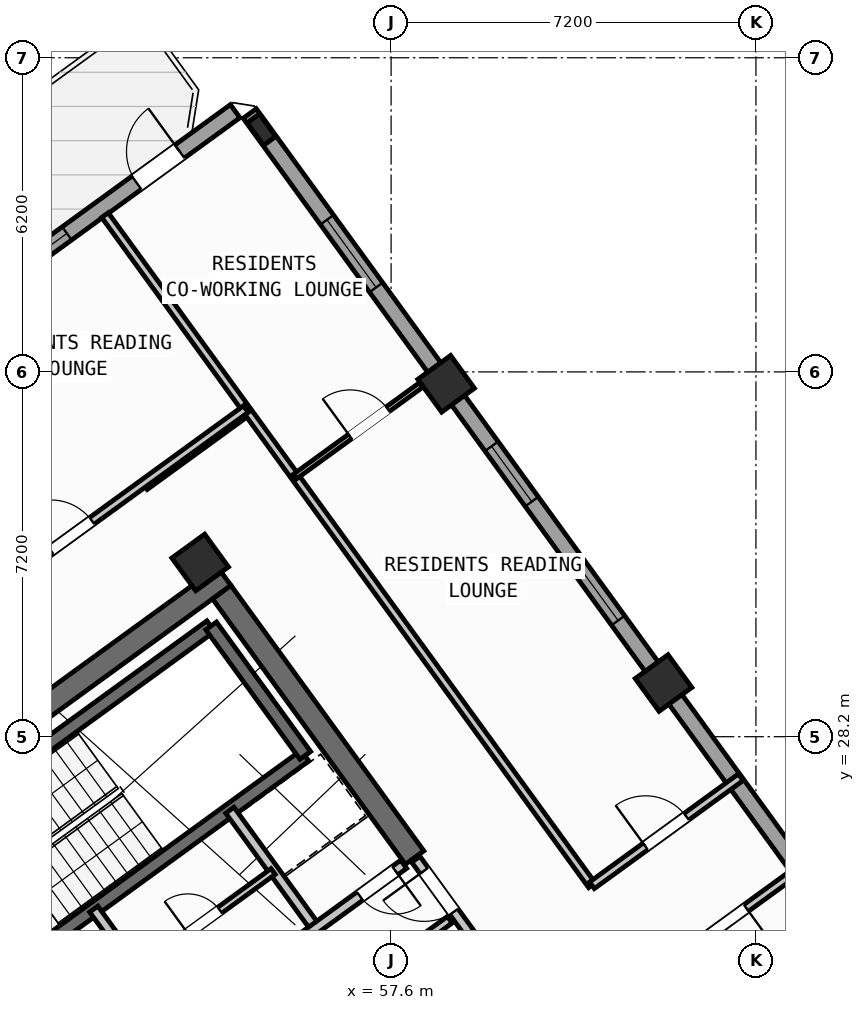
"""IFC4 building model, lengths in metres.
Left out: names, types, materials, properties, quantities, classifications, styles, units other than length and angle.
Written with IfcOpenShell. Run it as: python <this file> out.ifc"""

import sys

from ifc_helpers import new_model, si_unit, direction, frame, frame_2d, origin, origin_2d, place, context, subcontext, project, spatial, rectangle, hollow_rectangle, i_section, extrude, source, transform, mapped, element, fill, save


model = new_model("IFC4")
c1 = context("Model", 3, precision=1e-05, world=origin(), true_north=direction((0.0, 1.0)))
c2 = subcontext(c1, "Body", "Model", "MODEL_VIEW")
j1 = project(units=[si_unit("LENGTHUNIT", "METRE"), si_unit("PLANEANGLEUNIT", "RADIAN")], contexts=[c1])
p1 = place(None, origin())
s1 = spatial("IfcSite", under=j1, at=p1, CompositionType="ELEMENT")
p2 = place(p1, origin())
s2 = spatial("IfcBuilding", under=s1, at=p2, CompositionType="ELEMENT")
p3 = place(p2, frame((0.0, 0.0, 225.6)))
s3 = spatial("IfcBuildingStorey", under=s2, at=p3, CompositionType="ELEMENT", Elevation=225.6)
p4 = place(p3, frame((44.406, 24.172, 0.0), z_axis=(0.0, 0.0, 1.0), x_axis=(0.809012867805, 0.587790931986, 0.0)))
e1 = element("IfcWall", 1, at=p4, inside=s3, PredefinedType="SHEAR", context=c2, shape_type="SweptSolid", body=[
    extrude(rectangle(XDim=12.24, YDim=0.45, at=frame_2d((6.12, 0.0))), origin(), (0.0, 0.0, 1.0), 3.35),
])
p5 = place(p3, frame((58.064, 25.813, 0.0), z_axis=(0.0, 0.0, 1.0), x_axis=(-0.587774812919, 0.809024578921, 0.0)))
e2 = element("IfcWall", 2, at=p5, inside=s3, PredefinedType="SHEAR", context=c2, shape_type="SweptSolid", body=[
    extrude(rectangle(XDim=6.475, YDim=0.45, at=frame_2d((3.238, 0.0))), origin(), (0.0, 0.0, 1.0), 3.35),
])
m1 = source(origin(), c2, "Body", "SweptSolid", [
    extrude(hollow_rectangle(XDim=0.8, YDim=0.8, WallThickness=0.032, at=origin_2d()), origin(), (0.0, 0.0, 1.0), 3.6),
])
for number, where, z_axis, x_axis in (
    (3, (53.832, 31.638, 0.0), (0.0, 0.0, 1.0), (0.809, 0.588, 0.0)),
    (4, (62.977, 29.259, 0.0), (0.0, 0.0, 1.0), (0.809, 0.588, 0.0)),
    (5, (58.686, 35.165, 0.0), (0.0, 0.0, 1.0), (0.809, 0.588, 0.0)),
):
    element("IfcColumn", number, at=place(p3, frame(where, z_axis=z_axis, x_axis=x_axis)), inside=s3, PredefinedType="COLUMN", context=c2, shape_type="MappedRepresentation", body=[
        mapped(m1, transform((0.0, 0.0, 0.0), scale=1.0)),
    ])
m2 = source(origin(), c2, "Body", "SweptSolid", [
    extrude(i_section(OverallWidth=0.3, OverallDepth=0.55, WebThickness=0.015, FlangeThickness=0.029, at=origin_2d()), origin(), (0.0, 0.0, 1.0), 3.6),
])
p6 = place(p3, frame((55.042, 40.181, 0.0), z_axis=(0.0, 0.0, 1.0), x_axis=(0.809016994375, 0.587785252292, 0.0)))
e6 = element("IfcColumn", 6, at=p6, inside=s3, PredefinedType="COLUMN", context=c2, shape_type="MappedRepresentation", body=[
    mapped(m2, transform((0.0, 0.0, 0.0), scale=1.0)),
])
p7 = place(p3, frame((42.207, 31.597, 0.0), z_axis=(0.0, 0.0, 1.0), x_axis=(0.809020333377, 0.587780656523, 0.0)))
e7 = element("IfcWall", 7, at=p7, inside=s3, PredefinedType="STANDARD", context=c2, shape_type="SweptSolid", body=[
    extrude(rectangle(XDim=15.223, YDim=0.32, at=frame_2d((7.611, 0.0))), origin(), (0.0, 0.0, 1.0), 3.35),
])
p8 = place(p7, frame((12.82, 0.0, 0.0)))
e8 = element("IfcOpeningElement", 8, at=p8, cuts=e7, PredefinedType="OPENING", context=c2, shape_type="SweptSolid", body=[
    extrude(rectangle(XDim=1.05, YDim=2.15, at=frame_2d((0.525, 1.075))), frame((0.0, 0.17, 0.0), z_axis=(0.0, -1.0, 0.0), x_axis=(1.0, 0.0, 0.0)), (0.0, 0.0, 1.0), 0.34),
])
p9 = place(p7, frame((0.85, 0.0, 0.9)))
e9 = element("IfcOpeningElement", 9, at=p9, cuts=e7, PredefinedType="OPENING", context=c2, shape_type="SweptSolid", body=[
    extrude(rectangle(XDim=1.65, YDim=1.45, at=frame_2d((0.825, 0.725))), frame((0.0, 0.17, 0.0), z_axis=(0.0, -1.0, 0.0), x_axis=(1.0, 0.0, 0.0)), (0.0, 0.0, 1.0), 0.34),
])
p10 = place(p7, frame((5.769, 0.0, 0.9)))
e10 = element("IfcOpeningElement", 10, at=p10, cuts=e7, PredefinedType="OPENING", context=c2, shape_type="SweptSolid", body=[
    extrude(rectangle(XDim=1.35, YDim=1.45, at=frame_2d((0.675, 0.725))), frame((0.0, 0.17, 0.0), z_axis=(0.0, -1.0, 0.0), x_axis=(1.0, 0.0, 0.0)), (0.0, 0.0, 1.0), 0.34),
])
p11 = place(p7, frame((10.219, 0.0, 1.0)))
e11 = element("IfcOpeningElement", 11, at=p11, cuts=e7, PredefinedType="OPENING", context=c2, shape_type="SweptSolid", body=[
    extrude(rectangle(XDim=0.9, YDim=1.25, at=frame_2d((0.45, 0.625))), frame((0.0, 0.17, 0.0), z_axis=(0.0, -1.0, 0.0), x_axis=(1.0, 0.0, 0.0)), (0.0, 0.0, 1.0), 0.34),
])
p12 = place(p3, frame((54.81, 40.5, 0.0), z_axis=(0.0, 0.0, 1.0), x_axis=(0.587783625747, -0.809018176127, 0.0)))
e12 = element("IfcWall", 12, at=p12, inside=s3, PredefinedType="STANDARD", context=c2, shape_type="SweptSolid", body=[
    extrude(rectangle(XDim=21.587, YDim=0.32, at=frame_2d((10.794, 0.0))), origin(), (0.0, 0.0, 1.0), 2.825),
])
p13 = place(p12, frame((2.593, 0.0, 0.9)))
e13 = element("IfcOpeningElement", 13, at=p13, cuts=e12, PredefinedType="OPENING", context=c2, shape_type="SweptSolid", body=[
    extrude(rectangle(XDim=1.65, YDim=1.45, at=frame_2d((0.825, 0.725))), frame((0.0, 0.17, 0.0), z_axis=(0.0, -1.0, 0.0), x_axis=(1.0, 0.0, 0.0)), (0.0, 0.0, 1.0), 0.34),
])
p14 = place(p12, frame((8.119, 0.0, 0.9)))
e14 = element("IfcOpeningElement", 14, at=p14, cuts=e12, PredefinedType="OPENING", context=c2, shape_type="SweptSolid", body=[
    extrude(rectangle(XDim=1.35, YDim=1.45, at=frame_2d((0.675, 0.725))), frame((0.0, 0.17, 0.0), z_axis=(0.0, -1.0, 0.0), x_axis=(1.0, 0.0, 0.0)), (0.0, 0.0, 1.0), 0.34),
])
p15 = place(p12, frame((11.019, 0.0, 0.9)))
e15 = element("IfcOpeningElement", 15, at=p15, cuts=e12, PredefinedType="OPENING", context=c2, shape_type="SweptSolid", body=[
    extrude(rectangle(XDim=1.35, YDim=1.45, at=frame_2d((0.675, 0.725))), frame((0.0, 0.17, 0.0), z_axis=(0.0, -1.0, 0.0), x_axis=(1.0, 0.0, 0.0)), (0.0, 0.0, 1.0), 0.34),
])
p16 = place(p12, frame((19.259, 0.0, 1.0)))
e16 = element("IfcOpeningElement", 16, at=p16, cuts=e12, PredefinedType="OPENING", context=c2, shape_type="SweptSolid", body=[
    extrude(rectangle(XDim=0.9, YDim=1.25, at=frame_2d((0.45, 0.625))), frame((0.0, 0.17, 0.0), z_axis=(0.0, -1.0, 0.0), x_axis=(1.0, 0.0, 0.0)), (0.0, 0.0, 1.0), 0.34),
])
p17 = place(p3, frame((48.006, 25.996, 0.0), z_axis=(0.0, 0.0, 1.0), x_axis=(0.80901903764, 0.587782439969, 0.0)))
e17 = element("IfcWall", 17, at=p17, inside=s3, PredefinedType="SHEAR", context=c2, shape_type="SweptSolid", body=[
    extrude(rectangle(XDim=7.46, YDim=0.26, at=frame_2d((3.73, 0.0))), origin(), (0.0, 0.0, 1.0), 3.35),
])
p18 = place(p3, frame((49.863, 23.44, 0.0), z_axis=(0.0, 0.0, 1.0), x_axis=(0.809003474932, 0.587803859759, 0.0)))
e18 = element("IfcWall", 18, at=p18, inside=s3, PredefinedType="SHEAR", context=c2, shape_type="SweptSolid", body=[
    extrude(rectangle(XDim=7.46, YDim=0.26, at=frame_2d((3.73, 0.0))), origin(), (0.0, 0.0, 1.0), 3.35),
])
p19 = place(p18, frame((0.36, 0.0, 0.0)))
e19 = element("IfcOpeningElement", 19, at=p19, cuts=e18, PredefinedType="OPENING", context=c2, shape_type="SweptSolid", body=[
    extrude(rectangle(XDim=0.86, YDim=2.05, at=frame_2d((0.43, 1.025))), frame((0.0, 0.14, 0.0), z_axis=(0.0, -1.0, 0.0), x_axis=(1.0, 0.0, 0.0)), (0.0, 0.0, 1.0), 0.28),
])
p20 = place(p3, frame((55.906, 27.831, 0.0), z_axis=(0.0, 0.0, 1.0), x_axis=(-0.587804123638, 0.809003283204, 0.0)))
e20 = element("IfcWall", 20, at=p20, inside=s3, PredefinedType="SHEAR", context=c2, shape_type="SweptSolid", body=[
    extrude(rectangle(XDim=3.16, YDim=0.26, at=frame_2d((1.58, 0.0))), origin(), (0.0, 0.0, 1.0), 3.35),
])
p21 = place(p3, frame((54.421, 21.436, 0.0), z_axis=(0.0, 0.0, 1.0), x_axis=(0.809013710463, 0.587789772183, 0.0)))
e21 = element("IfcWall", 21, at=p21, inside=s3, PredefinedType="PARTITIONING", context=c2, shape_type="SweptSolid", body=[
    extrude(rectangle(XDim=5.36, YDim=0.16, at=frame_2d((2.68, 0.0))), origin(), (0.0, 0.0, 1.0), 3.34),
])
p22 = place(p21, frame((1.4, 0.0, 0.0)))
e22 = element("IfcOpeningElement", 22, at=p22, cuts=e21, PredefinedType="OPENING", context=c2, shape_type="SweptSolid", body=[
    extrude(rectangle(XDim=0.86, YDim=2.05, at=frame_2d((0.43, 1.025))), frame((0.0, 0.09, 0.0), z_axis=(0.0, -1.0, 0.0), x_axis=(1.0, 0.0, 0.0)), (0.0, 0.0, 1.0), 0.18),
])
p23 = place(p3, frame((53.425, 22.468, 0.0), z_axis=(0.0, 0.0, 1.0), x_axis=(-0.5877230039, 0.809062216821, 0.0)))
e23 = element("IfcWall", 23, at=p23, inside=s3, PredefinedType="STANDARD", context=c2, shape_type="SweptSolid", body=[
    extrude(rectangle(XDim=2.88, YDim=0.2, at=frame_2d((1.44, 0.0))), origin(), (0.0, 0.0, 1.0), 3.34),
])
p24 = place(p3, frame((56.111, 24.419, 0.0), z_axis=(0.0, 0.0, 1.0), x_axis=(-0.58777848983, 0.809021907548, 0.0)))
e24 = element("IfcWall", 24, at=p24, inside=s3, PredefinedType="STANDARD", context=c2, shape_type="SweptSolid", body=[
    extrude(rectangle(XDim=2.88, YDim=0.2, at=frame_2d((1.44, 0.0))), origin(), (0.0, 0.0, 1.0), 3.34),
])
p25 = place(p3, frame((53.425, 22.468, 0.0), z_axis=(0.0, 0.0, 1.0), x_axis=(0.809015945709, 0.587786695655, 0.0)))
e25 = element("IfcWall", 25, at=p25, inside=s3, PredefinedType="STANDARD", context=c2, shape_type="SweptSolid", body=[
    extrude(rectangle(XDim=5.468, YDim=0.2, at=frame_2d((2.734, 0.0))), origin(), (0.0, 0.0, 1.0), 3.34),
])
p26 = place(p25, frame((4.4, 0.0, 0.0)))
e26 = element("IfcOpeningElement", 26, at=p26, cuts=e25, PredefinedType="OPENING", context=c2, shape_type="SweptSolid", body=[
    extrude(rectangle(XDim=0.86, YDim=2.05, at=frame_2d((0.43, 1.025))), frame((0.0, 0.11, 0.0), z_axis=(0.0, -1.0, 0.0), x_axis=(1.0, 0.0, 0.0)), (0.0, 0.0, 1.0), 0.22),
])
p27 = place(p25, frame((1.45, 0.0, 0.0)))
e27 = element("IfcOpeningElement", 27, at=p27, cuts=e25, PredefinedType="OPENING", context=c2, shape_type="SweptSolid", body=[
    extrude(rectangle(XDim=0.86, YDim=2.05, at=frame_2d((0.43, 1.025))), frame((0.0, 0.11, 0.0), z_axis=(0.0, -1.0, 0.0), x_axis=(1.0, 0.0, 0.0)), (0.0, 0.0, 1.0), 0.22),
])
p28 = place(p3, frame((52.618, 23.612, 0.0), z_axis=(0.0, 0.0, 1.0), x_axis=(0.809009587469, 0.587795446889, 0.0)))
e28 = element("IfcWall", 28, at=p28, inside=s3, PredefinedType="PLUMBINGWALL", context=c2, shape_type="SweptSolid", body=[
    extrude(rectangle(XDim=3.28, YDim=0.14, at=frame_2d((1.64, 0.0))), origin(), (0.0, 0.0, 1.0), 3.34),
])
p29 = place(p28, frame((1.2, 0.0, 0.0)))
e29 = element("IfcOpeningElement", 29, at=p29, cuts=e28, PredefinedType="OPENING", context=c2, shape_type="SweptSolid", body=[
    extrude(rectangle(XDim=0.78, YDim=2.05, at=frame_2d((0.39, 1.025))), frame((0.0, 0.08, 0.0), z_axis=(0.0, -1.0, 0.0), x_axis=(1.0, 0.0, 0.0)), (0.0, 0.0, 1.0), 0.16),
])
p30 = place(p3, frame((59.827, 23.386, 0.0), z_axis=(0.0, 0.0, 1.0), x_axis=(-0.587803840107, 0.809003489211, 0.0)))
e30 = element("IfcWall", 30, at=p30, inside=s3, PredefinedType="STANDARD", context=c2, shape_type="SweptSolid", body=[
    extrude(rectangle(XDim=2.96, YDim=0.2, at=frame_2d((1.48, 0.0))), origin(), (0.0, 0.0, 1.0), 3.34),
])
p31 = place(p30, frame((1.68, 0.0, 0.0)))
e31 = element("IfcOpeningElement", 31, at=p31, cuts=e30, PredefinedType="OPENING", context=c2, shape_type="SweptSolid", body=[
    extrude(rectangle(XDim=1.0, YDim=2.1, at=frame_2d((0.5, 1.05))), frame((0.0, 0.11, 0.0), z_axis=(0.0, -1.0, 0.0), x_axis=(1.0, 0.0, 0.0)), (0.0, 0.0, 1.0), 0.22),
])
p32 = place(p3, frame((52.739, 33.143, 0.0), z_axis=(0.0, 0.0, 1.0), x_axis=(0.809000999347, 0.58780726693, 0.0)))
e32 = element("IfcWall", 32, at=p32, inside=s3, PredefinedType="PARTITIONING", context=c2, shape_type="SweptSolid", body=[
    extrude(rectangle(XDim=2.51, YDim=0.16, at=frame_2d((1.255, 0.0))), origin(), (0.0, 0.0, 1.0), 3.34),
])
p33 = place(p3, frame((61.564, 25.266, 0.0), z_axis=(0.0, 0.0, 1.0), x_axis=(-0.587784527444, 0.809017521007, 0.0)))
e33 = element("IfcWall", 33, at=p33, inside=s3, PredefinedType="PARTITIONING", context=c2, shape_type="SweptSolid", body=[
    extrude(rectangle(XDim=16.35, YDim=0.16, at=frame_2d((8.175, 0.0))), origin(), (0.0, 0.0, 1.0), 3.34),
])
p34 = place(p3, frame((62.828, 23.527, 0.0), z_axis=(0.0, 0.0, 1.0), x_axis=(0.809003564202, 0.587803736896, 0.0)))
e34 = element("IfcWall", 34, at=p34, inside=s3, PredefinedType="PARTITIONING", context=c2, shape_type="SweptSolid", body=[
    extrude(rectangle(XDim=3.63, YDim=0.16, at=frame_2d((1.815, 0.0))), origin(), (0.0, 0.0, 1.0), 3.34),
])
p35 = place(p34, frame((1.2, 0.0, 0.0)))
e35 = element("IfcOpeningElement", 35, at=p35, cuts=e34, PredefinedType="OPENING", context=c2, shape_type="SweptSolid", body=[
    extrude(rectangle(XDim=1.0, YDim=2.1, at=frame_2d((0.5, 1.05))), frame((0.0, 0.09, 0.0), z_axis=(0.0, -1.0, 0.0), x_axis=(1.0, 0.0, 0.0)), (0.0, 0.0, 1.0), 0.18),
])
p36 = place(p3, frame((61.564, 25.266, 0.0), z_axis=(0.0, 0.0, 1.0), x_axis=(0.809012309495, 0.587791700422, 0.0)))
e36 = element("IfcWall", 36, at=p36, inside=s3, PredefinedType="PARTITIONING", context=c2, shape_type="SweptSolid", body=[
    extrude(rectangle(XDim=3.63, YDim=0.16, at=frame_2d((1.815, 0.0))), origin(), (0.0, 0.0, 1.0), 3.34),
])
p37 = place(p36, frame((1.305, 0.0, 0.0)))
e37 = element("IfcOpeningElement", 37, at=p37, cuts=e36, PredefinedType="OPENING", context=c2, shape_type="SweptSolid", body=[
    extrude(rectangle(XDim=1.0, YDim=2.1, at=frame_2d((0.5, 1.05))), frame((0.0, 0.09, 0.0), z_axis=(0.0, -1.0, 0.0), x_axis=(1.0, 0.0, 0.0)), (0.0, 0.0, 1.0), 0.18),
])
p38 = place(p3, frame((55.703, 33.334, 0.0), z_axis=(0.0, 0.0, 1.0), x_axis=(0.809044670406, 0.587747157618, 0.0)))
e38 = element("IfcWall", 38, at=p38, inside=s3, PredefinedType="PARTITIONING", context=c2, shape_type="SweptSolid", body=[
    extrude(rectangle(XDim=3.078, YDim=0.11, at=frame_2d((1.539, 0.0))), origin(), (0.0, 0.0, 1.0), 2.825),
])
p39 = place(p38, frame((1.345, 0.0, 0.0)))
e39 = element("IfcOpeningElement", 39, at=p39, cuts=e38, PredefinedType="OPENING", context=c2, shape_type="SweptSolid", body=[
    extrude(rectangle(XDim=0.92, YDim=2.08, at=frame_2d((0.46, 1.04))), frame((0.0, 0.065, 0.0), z_axis=(0.0, -1.0, 0.0), x_axis=(1.0, 0.0, 0.0)), (0.0, 0.0, 1.0), 0.13),
])
p40 = place(p3, frame((42.866, 26.044, 0.0), z_axis=(0.0, 0.0, 1.0), x_axis=(0.809020254154, 0.587780765566, 0.0)))
e40 = element("IfcWall", 40, at=p40, inside=s3, PredefinedType="PARTITIONING", context=c2, shape_type="SweptSolid", body=[
    extrude(rectangle(XDim=14.67, YDim=0.16, at=frame_2d((7.335, 0.0))), origin(), (0.0, 0.0, 1.0), 3.34),
])
p41 = place(p40, frame((3.215, 0.0, 0.0)))
e41 = element("IfcOpeningElement", 41, at=p41, cuts=e40, PredefinedType="OPENING", context=c2, shape_type="SweptSolid", body=[
    extrude(rectangle(XDim=1.0, YDim=2.1, at=frame_2d((0.5, 1.05))), frame((0.0, 0.09, 0.0), z_axis=(0.0, -1.0, 0.0), x_axis=(1.0, 0.0, 0.0)), (0.0, 0.0, 1.0), 0.18),
])
p42 = place(p40, frame((9.915, 0.0, 0.0)))
e42 = element("IfcOpeningElement", 42, at=p42, cuts=e40, PredefinedType="OPENING", context=c2, shape_type="SweptSolid", body=[
    extrude(rectangle(XDim=1.0, YDim=2.1, at=frame_2d((0.5, 1.05))), frame((0.0, 0.09, 0.0), z_axis=(0.0, -1.0, 0.0), x_axis=(1.0, 0.0, 0.0)), (0.0, 0.0, 1.0), 0.18),
])
m3 = source(origin(), c2, "Body", "SweptSolid", [
    extrude(rectangle(XDim=1.05, YDim=2.15, at=frame_2d((0.525, 1.075))), frame((0.0, 0.025, 0.0), z_axis=(0.0, -1.0, 0.0), x_axis=(1.0, 0.0, 0.0)), (0.0, 0.0, 1.0), 0.05),
])
p43 = place(p8, origin())
e43 = element("IfcDoor", 43, at=p43, inside=s3, OperationType="SINGLE_SWING_RIGHT", PredefinedType="DOOR", context=c2, shape_type="MappedRepresentation", body=[
    mapped(m3, transform((0.0, 0.0, 0.0), scale=1.0)),
])
fill(e8, e43)
m4 = source(origin(), c2, "Body", "SweptSolid", [
    extrude(rectangle(XDim=0.9, YDim=1.25, at=frame_2d((0.45, 0.625))), frame((0.0, 0.03, 0.0), z_axis=(0.0, -1.0, 0.0), x_axis=(1.0, 0.0, 0.0)), (0.0, 0.0, 1.0), 0.06),
])
p44 = place(p11, origin())
e44 = element("IfcWindow", 44, at=p44, inside=s3, PartitioningType="SINGLE_PANEL", PredefinedType="WINDOW", context=c2, shape_type="MappedRepresentation", body=[
    mapped(m4, transform((0.0, 0.0, 0.0), scale=1.0)),
])
fill(e11, e44)
m5 = source(origin(), c2, "Body", "SweptSolid", [
    extrude(rectangle(XDim=1.65, YDim=1.45, at=frame_2d((0.825, 0.725))), frame((0.0, 0.03, 0.0), z_axis=(0.0, -1.0, 0.0), x_axis=(1.0, 0.0, 0.0)), (0.0, 0.0, 1.0), 0.06),
])
p45 = place(p13, origin())
e45 = element("IfcWindow", 45, at=p45, inside=s3, PartitioningType="SINGLE_PANEL", PredefinedType="WINDOW", context=c2, shape_type="MappedRepresentation", body=[
    mapped(m5, transform((0.0, 0.0, 0.0), scale=1.0)),
])
fill(e13, e45)
m6 = source(origin(), c2, "Body", "SweptSolid", [
    extrude(rectangle(XDim=1.35, YDim=1.45, at=frame_2d((0.675, 0.725))), frame((0.0, 0.03, 0.0), z_axis=(0.0, -1.0, 0.0), x_axis=(1.0, 0.0, 0.0)), (0.0, 0.0, 1.0), 0.06),
])
p46 = place(p14, origin())
e46 = element("IfcWindow", 46, at=p46, inside=s3, PartitioningType="SINGLE_PANEL", PredefinedType="WINDOW", context=c2, shape_type="MappedRepresentation", body=[
    mapped(m6, transform((0.0, 0.0, 0.0), scale=1.0)),
])
fill(e14, e46)
p47 = place(p15, origin())
e47 = element("IfcWindow", 47, at=p47, inside=s3, PartitioningType="SINGLE_PANEL", PredefinedType="WINDOW", context=c2, shape_type="MappedRepresentation", body=[
    mapped(m6, transform((0.0, 0.0, 0.0), scale=1.0)),
])
fill(e15, e47)
m7 = source(origin(), c2, "Body", "SweptSolid", [
    extrude(rectangle(XDim=0.86, YDim=2.05, at=frame_2d((0.43, 1.025))), frame((0.0, 0.025, 0.0), z_axis=(0.0, -1.0, 0.0), x_axis=(1.0, 0.0, 0.0)), (0.0, 0.0, 1.0), 0.05),
])
p48 = place(p26, frame((0.86, 0.0, 0.0), z_axis=(0.0, 0.0, 1.0), x_axis=(-1.0, 0.0, 0.0)))
e48 = element("IfcDoor", 48, at=p48, inside=s3, OperationType="SINGLE_SWING_LEFT", PredefinedType="DOOR", context=c2, shape_type="MappedRepresentation", body=[
    mapped(m7, transform((0.0, 0.0, 0.0), scale=1.0)),
])
fill(e26, e48)
m8 = source(origin(), c2, "Body", "SweptSolid", [
    extrude(rectangle(XDim=0.78, YDim=2.05, at=frame_2d((0.39, 1.025))), frame((0.0, 0.025, 0.0), z_axis=(0.0, -1.0, 0.0), x_axis=(1.0, 0.0, 0.0)), (0.0, 0.0, 1.0), 0.05),
])
p49 = place(p29, origin())
e49 = element("IfcDoor", 49, at=p49, inside=s3, OperationType="SINGLE_SWING_LEFT", PredefinedType="DOOR", context=c2, shape_type="MappedRepresentation", body=[
    mapped(m8, transform((0.0, 0.0, 0.0), scale=1.0)),
])
fill(e29, e49)
m9 = source(origin(), c2, "Body", "SweptSolid", [
    extrude(rectangle(XDim=1.0, YDim=2.1, at=frame_2d((0.5, 1.05))), frame((0.0, 0.025, 0.0), z_axis=(0.0, -1.0, 0.0), x_axis=(1.0, 0.0, 0.0)), (0.0, 0.0, 1.0), 0.05),
])
p50 = place(p31, origin())
e50 = element("IfcDoor", 50, at=p50, inside=s3, OperationType="SINGLE_SWING_RIGHT", PredefinedType="DOOR", context=c2, shape_type="MappedRepresentation", body=[
    mapped(m9, transform((0.0, 0.0, 0.0), scale=1.0)),
])
fill(e31, e50)
p51 = place(p37, origin())
e51 = element("IfcDoor", 51, at=p51, inside=s3, OperationType="SINGLE_SWING_LEFT", PredefinedType="DOOR", context=c2, shape_type="MappedRepresentation", body=[
    mapped(m9, transform((0.0, 0.0, 0.0), scale=1.0)),
])
fill(e37, e51)
m10 = source(origin(), c2, "Body", "SweptSolid", [
    extrude(rectangle(XDim=0.92, YDim=2.08, at=frame_2d((0.46, 1.04))), frame((0.0, 0.025, 0.0), z_axis=(0.0, -1.0, 0.0), x_axis=(1.0, 0.0, 0.0)), (0.0, 0.0, 1.0), 0.05),
])
p52 = place(p39, origin())
e52 = element("IfcDoor", 52, at=p52, inside=s3, OperationType="SINGLE_SWING_LEFT", PredefinedType="DOOR", context=c2, shape_type="MappedRepresentation", body=[
    mapped(m10, transform((0.0, 0.0, 0.0), scale=1.0)),
])
fill(e39, e52)
p53 = place(p35, frame((1.0, 0.0, 0.0), z_axis=(0.0, 0.0, 1.0), x_axis=(-1.0, 0.0, 0.0)))
e53 = element("IfcDoor", 53, at=p53, inside=s3, OperationType="SINGLE_SWING_LEFT", PredefinedType="DOOR", context=c2, shape_type="MappedRepresentation", body=[
    mapped(m9, transform((0.0, 0.0, 0.0), scale=1.0)),
])
fill(e35, e53)
p54 = place(p42, origin())
e54 = element("IfcDoor", 54, at=p54, inside=s3, OperationType="SINGLE_SWING_LEFT", PredefinedType="DOOR", context=c2, shape_type="MappedRepresentation", body=[
    mapped(m9, transform((0.0, 0.0, 0.0), scale=1.0)),
])
fill(e42, e54)
save(model, sys.argv[1])
